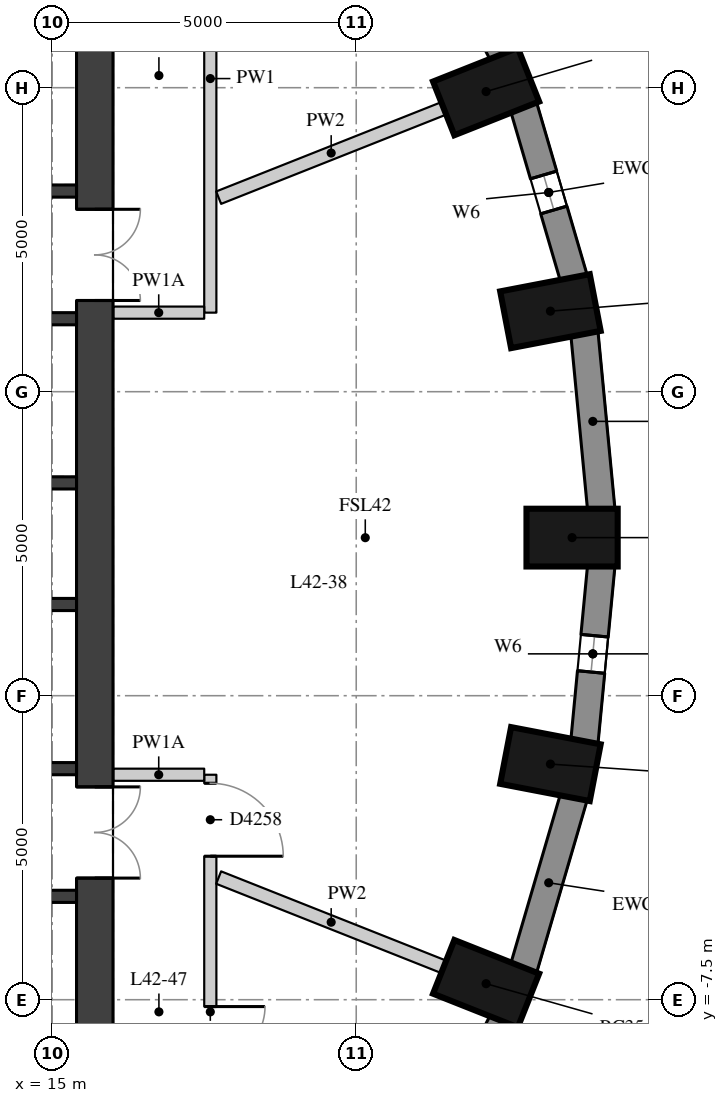
"""IFC4 building model, lengths in metres.
Left out: names, types, materials, properties, quantities, classifications, styles, units other than length and angle.
Written with IfcOpenShell. Run it as: python <this file> out.ifc"""

import sys

from ifc_helpers import new_model, si_unit, direction, frame, frame_2d, origin, origin_2d, place, context, subcontext, project, spatial, rectangle, extrude, element, fill, save


model = new_model("IFC4")
c1 = context("Model", 3, precision=1e-05, world=origin(), true_north=direction((0.0, 1.0)))
c2 = subcontext(c1, "Body", "Model", "MODEL_VIEW")
j1 = project(units=[si_unit("LENGTHUNIT", "METRE"), si_unit("PLANEANGLEUNIT", "RADIAN")], contexts=[c1])
p1 = place(None, origin())
s1 = spatial("IfcSite", under=j1, at=p1, CompositionType="ELEMENT")
p2 = place(p1, origin())
s2 = spatial("IfcBuilding", under=s1, at=p2, CompositionType="ELEMENT")
p3 = place(p2, frame((0.0, 0.0, 151.7)))
s3 = spatial("IfcBuildingStorey", under=s2, at=p3, CompositionType="ELEMENT", Elevation=151.7)
for number, where, z_axis, x_axis in (
    (1, (23.55, 0.1, 0.0), (0.0, 0.0, 1.0), (1.0, 0.0, 0.0)),
    (2, (23.194, 3.825, 0.0), (0.0, 0.0, 1.0), (0.982, 0.189, 0.0)),
    (3, (22.136, 7.436, 0.0), (0.0, 0.0, 1.0), (0.93, 0.369, 0.0)),
    (4, (22.136, -7.236, 0.0), (0.0, 0.0, 1.0), (0.93, -0.369, 0.0)),
    (5, (23.194, -3.625, 0.0), (0.0, 0.0, 1.0), (0.982, -0.189, 0.0)),
):
    element("IfcColumn", number, at=place(p3, frame(where, z_axis=z_axis, x_axis=x_axis)), inside=s3, PredefinedType="COLUMN", context=c2, shape_type="SweptSolid", body=[
        extrude(rectangle(XDim=1.5, YDim=0.95, at=origin_2d()), origin(), (0.0, 0.0, 1.0), 3.3),
    ])
p4 = place(p3, frame((24.031, 0.555, 0.0), z_axis=(0.0, 0.0, 1.0), x_axis=(-0.095265737322, 0.995451876935, 0.0)))
e6 = element("IfcWall", 6, at=p4, inside=s3, PredefinedType="SOLIDWALL", context=c2, shape_type="SweptSolid", body=[
    extrude(rectangle(XDim=2.927, YDim=0.45, at=frame_2d((1.463, 0.0))), origin(), (0.0, 0.0, 1.0), 3.02),
])
p5 = place(p3, frame((23.58, 4.362, 0.0), z_axis=(0.0, 0.0, 1.0), x_axis=(-0.281049481624, 0.959693278542, 0.0)))
e7 = element("IfcWall", 7, at=p5, inside=s3, PredefinedType="SOLIDWALL", context=c2, shape_type="SweptSolid", body=[
    extrude(rectangle(XDim=2.948, YDim=0.45, at=frame_2d((1.474, 0.0))), origin(), (0.0, 0.0, 1.0), 3.02),
])
p6 = place(p5, frame((1.174, 0.0, 0.4)))
e8 = element("IfcOpeningElement", 8, at=p6, cuts=e7, PredefinedType="OPENING", context=c2, shape_type="SweptSolid", body=[
    extrude(rectangle(XDim=0.6, YDim=1.75, at=frame_2d((0.3, 0.875))), frame((0.0, 0.235, 0.0), z_axis=(0.0, -1.0, 0.0), x_axis=(1.0, 0.0, 0.0)), (0.0, 0.0, 1.0), 0.47),
])
p7 = place(p3, frame((22.415, 8.037, 0.0), z_axis=(0.0, 0.0, 1.0), x_axis=(-0.454133999889, 0.890933392653, 0.0)))
e9 = element("IfcWall", 9, at=p7, inside=s3, PredefinedType="SOLIDWALL", context=c2, shape_type="SweptSolid", body=[
    extrude(rectangle(XDim=2.986, YDim=0.45, at=frame_2d((1.493, 0.0))), origin(), (0.0, 0.0, 1.0), 3.02),
])
p8 = place(p3, frame((21.059, -10.497, 0.0), z_axis=(0.0, 0.0, 1.0), x_axis=(0.454133999889, 0.890933392653, 0.0)))
e10 = element("IfcWall", 10, at=p8, inside=s3, PredefinedType="SOLIDWALL", context=c2, shape_type="SweptSolid", body=[
    extrude(rectangle(XDim=2.986, YDim=0.45, at=frame_2d((1.493, 0.0))), origin(), (0.0, 0.0, 1.0), 3.02),
])
p9 = place(p8, frame((1.193, 0.0, 0.4)))
e11 = element("IfcOpeningElement", 11, at=p9, cuts=e10, PredefinedType="OPENING", context=c2, shape_type="SweptSolid", body=[
    extrude(rectangle(XDim=0.6, YDim=1.75, at=frame_2d((0.3, 0.875))), frame((0.0, 0.235, 0.0), z_axis=(0.0, -1.0, 0.0), x_axis=(1.0, 0.0, 0.0)), (0.0, 0.0, 1.0), 0.47),
])
p10 = place(p3, frame((22.751, -6.991, 0.0), z_axis=(0.0, 0.0, 1.0), x_axis=(0.281049481624, 0.959693278542, 0.0)))
e12 = element("IfcWall", 12, at=p10, inside=s3, PredefinedType="SOLIDWALL", context=c2, shape_type="SweptSolid", body=[
    extrude(rectangle(XDim=2.948, YDim=0.45, at=frame_2d((1.474, 0.0))), origin(), (0.0, 0.0, 1.0), 3.02),
])
p11 = place(p3, frame((23.752, -3.269, 0.0), z_axis=(0.0, 0.0, 1.0), x_axis=(0.095257827044, 0.995452633924, 0.0)))
e13 = element("IfcWall", 13, at=p11, inside=s3, PredefinedType="SOLIDWALL", context=c2, shape_type="SweptSolid", body=[
    extrude(rectangle(XDim=2.927, YDim=0.45, at=frame_2d((1.463, 0.0))), origin(), (0.0, 0.0, 1.0), 3.02),
])
p12 = place(p11, frame((1.163, 0.0, 0.4)))
e14 = element("IfcOpeningElement", 14, at=p12, cuts=e13, PredefinedType="OPENING", context=c2, shape_type="SweptSolid", body=[
    extrude(rectangle(XDim=0.6, YDim=1.75, at=frame_2d((0.3, 0.875))), frame((0.0, 0.235, 0.0), z_axis=(0.0, -1.0, 0.0), x_axis=(1.0, 0.0, 0.0)), (0.0, 0.0, 1.0), 0.47),
])
p13 = place(p3, frame((15.7, -9.4, 0.0), z_axis=(0.0, 0.0, 1.0), x_axis=(0.0, 1.0, 0.0)))
e15 = element("IfcWall", 15, at=p13, inside=s3, PredefinedType="SHEAR", context=c2, shape_type="SweptSolid", body=[
    extrude(rectangle(XDim=18.8, YDim=0.6, at=frame_2d((9.4, 0.0))), origin(), (0.0, 0.0, 1.0), 3.02),
])
p14 = place(p13, frame((13.4, 0.0, 0.0)))
e16 = element("IfcOpeningElement", 16, at=p14, cuts=e15, PredefinedType="OPENING", context=c2, shape_type="SweptSolid", body=[
    extrude(rectangle(XDim=1.5, YDim=2.1, at=frame_2d((0.75, 1.05))), frame((0.0, 0.31, 0.0), z_axis=(0.0, -1.0, 0.0), x_axis=(1.0, 0.0, 0.0)), (0.0, 0.0, 1.0), 0.62),
])
p15 = place(p13, frame((3.9, 0.0, 0.0)))
e17 = element("IfcOpeningElement", 17, at=p15, cuts=e15, PredefinedType="OPENING", context=c2, shape_type="SweptSolid", body=[
    extrude(rectangle(XDim=1.5, YDim=2.1, at=frame_2d((0.75, 1.05))), frame((0.0, 0.31, 0.0), z_axis=(0.0, -1.0, 0.0), x_axis=(1.0, 0.0, 0.0)), (0.0, 0.0, 1.0), 0.62),
])
p16 = place(p3, frame((4.6, 5.8, 0.0), z_axis=(0.0, 0.0, 1.0), x_axis=(1.0, 0.0, 0.0)))
e18 = element("IfcWall", 18, at=p16, inside=s3, PredefinedType="SHEAR", context=c2, shape_type="SweptSolid", body=[
    extrude(rectangle(XDim=10.8, YDim=0.2, at=frame_2d((5.4, 0.0))), origin(), (0.0, 0.0, 1.0), 3.02),
])
p17 = place(p16, frame((7.05, 0.0, 0.0)))
e19 = element("IfcOpeningElement", 19, at=p17, cuts=e18, PredefinedType="OPENING", context=c2, shape_type="SweptSolid", body=[
    extrude(rectangle(XDim=1.1, YDim=2.1, at=frame_2d((0.55, 1.05))), frame((0.0, 0.11, 0.0), z_axis=(0.0, -1.0, 0.0), x_axis=(1.0, 0.0, 0.0)), (0.0, 0.0, 1.0), 0.22),
])
p18 = place(p16, frame((9.05, 0.0, 0.0)))
e20 = element("IfcOpeningElement", 20, at=p18, cuts=e18, PredefinedType="OPENING", context=c2, shape_type="SweptSolid", body=[
    extrude(rectangle(XDim=1.1, YDim=2.1, at=frame_2d((0.55, 1.05))), frame((0.0, 0.11, 0.0), z_axis=(0.0, -1.0, 0.0), x_axis=(1.0, 0.0, 0.0)), (0.0, 0.0, 1.0), 0.22),
])
p19 = place(p3, frame((4.6, 3.7, 0.0), z_axis=(0.0, 0.0, 1.0), x_axis=(1.0, 0.0, 0.0)))
e21 = element("IfcWall", 21, at=p19, inside=s3, PredefinedType="SHEAR", context=c2, shape_type="SweptSolid", body=[
    extrude(rectangle(XDim=10.8, YDim=0.2, at=frame_2d((5.4, 0.0))), origin(), (0.0, 0.0, 1.0), 3.02),
])
p20 = place(p19, frame((6.6, 0.0, 0.0)))
e22 = element("IfcOpeningElement", 22, at=p20, cuts=e21, PredefinedType="OPENING", context=c2, shape_type="SweptSolid", body=[
    extrude(rectangle(XDim=1.1, YDim=2.1, at=frame_2d((0.55, 1.05))), frame((0.0, 0.11, 0.0), z_axis=(0.0, -1.0, 0.0), x_axis=(1.0, 0.0, 0.0)), (0.0, 0.0, 1.0), 0.22),
])
p21 = place(p19, frame((8.9, 0.0, 0.0)))
e23 = element("IfcOpeningElement", 23, at=p21, cuts=e21, PredefinedType="OPENING", context=c2, shape_type="SweptSolid", body=[
    extrude(rectangle(XDim=1.1, YDim=2.1, at=frame_2d((0.55, 1.05))), frame((0.0, 0.11, 0.0), z_axis=(0.0, -1.0, 0.0), x_axis=(1.0, 0.0, 0.0)), (0.0, 0.0, 1.0), 0.22),
])
for number, where, z_axis, x_axis in (
    (24, (4.6, 1.0, 0.0), (0.0, 0.0, 1.0), (1.0, 0.0, 0.0)),
    (25, (4.6, -1.0, 0.0), (0.0, 0.0, 1.0), (1.0, 0.0, 0.0)),
):
    element("IfcWall", number, at=place(p3, frame(where, z_axis=z_axis, x_axis=x_axis)), inside=s3, PredefinedType="SHEAR", context=c2, shape_type="SweptSolid", body=[
        extrude(rectangle(XDim=10.8, YDim=0.2, at=frame_2d((5.4, 0.0))), origin(), (0.0, 0.0, 1.0), 3.02),
    ])
p22 = place(p3, frame((4.6, -3.7, 0.0), z_axis=(0.0, 0.0, 1.0), x_axis=(1.0, 0.0, 0.0)))
e26 = element("IfcWall", 26, at=p22, inside=s3, PredefinedType="SHEAR", context=c2, shape_type="SweptSolid", body=[
    extrude(rectangle(XDim=10.8, YDim=0.2, at=frame_2d((5.4, 0.0))), origin(), (0.0, 0.0, 1.0), 3.02),
])
p23 = place(p22, frame((6.6, 0.0, 0.0)))
e27 = element("IfcOpeningElement", 27, at=p23, cuts=e26, PredefinedType="OPENING", context=c2, shape_type="SweptSolid", body=[
    extrude(rectangle(XDim=1.1, YDim=2.1, at=frame_2d((0.55, 1.05))), frame((0.0, 0.11, 0.0), z_axis=(0.0, -1.0, 0.0), x_axis=(1.0, 0.0, 0.0)), (0.0, 0.0, 1.0), 0.22),
])
p24 = place(p22, frame((8.9, 0.0, 0.0)))
e28 = element("IfcOpeningElement", 28, at=p24, cuts=e26, PredefinedType="OPENING", context=c2, shape_type="SweptSolid", body=[
    extrude(rectangle(XDim=1.1, YDim=2.1, at=frame_2d((0.55, 1.05))), frame((0.0, 0.11, 0.0), z_axis=(0.0, -1.0, 0.0), x_axis=(1.0, 0.0, 0.0)), (0.0, 0.0, 1.0), 0.22),
])
p25 = place(p3, frame((4.6, -5.8, 0.0), z_axis=(0.0, 0.0, 1.0), x_axis=(1.0, 0.0, 0.0)))
e29 = element("IfcWall", 29, at=p25, inside=s3, PredefinedType="SHEAR", context=c2, shape_type="SweptSolid", body=[
    extrude(rectangle(XDim=10.8, YDim=0.2, at=frame_2d((5.4, 0.0))), origin(), (0.0, 0.0, 1.0), 3.02),
])
p26 = place(p3, frame((17.6, -3.8, 0.0), z_axis=(0.0, 0.0, 1.0), x_axis=(0.0, -1.0, 0.0)))
e30 = element("IfcWall", 30, at=p26, inside=s3, PredefinedType="PARTITIONING", context=c2, shape_type="SweptSolid", body=[
    extrude(rectangle(XDim=7.8, YDim=0.2, at=frame_2d((3.9, 0.0))), origin(), (0.0, 0.0, 1.0), 3.02),
])
p27 = place(p26, frame((3.813, 0.0, 0.0)))
e31 = element("IfcOpeningElement", 31, at=p27, cuts=e30, PredefinedType="OPENING", context=c2, shape_type="SweptSolid", body=[
    extrude(rectangle(XDim=1.8, YDim=2.1, at=frame_2d((0.9, 1.05))), frame((0.0, 0.11, 0.0), z_axis=(0.0, -1.0, 0.0), x_axis=(1.0, 0.0, 0.0)), (0.0, 0.0, 1.0), 0.22),
])
p28 = place(p26, frame((0.14, 0.0, 0.0)))
e32 = element("IfcOpeningElement", 32, at=p28, cuts=e30, PredefinedType="OPENING", context=c2, shape_type="SweptSolid", body=[
    extrude(rectangle(XDim=1.2, YDim=2.1, at=frame_2d((0.6, 1.05))), frame((0.0, 0.11, 0.0), z_axis=(0.0, -1.0, 0.0), x_axis=(1.0, 0.0, 0.0)), (0.0, 0.0, 1.0), 0.22),
])
p29 = place(p3, frame((17.6, 11.5, 0.0), z_axis=(0.0, 0.0, 1.0), x_axis=(0.0, -1.0, 0.0)))
e33 = element("IfcWall", 33, at=p29, inside=s3, PredefinedType="PARTITIONING", context=c2, shape_type="SweptSolid", body=[
    extrude(rectangle(XDim=7.7, YDim=0.2, at=frame_2d((3.85, 0.0))), origin(), (0.0, 0.0, 1.0), 3.02),
])
for number, where, z_axis, x_axis in (
    (34, (17.5, 3.8, 0.0), (0.0, 0.0, 1.0), (-1.0, 0.0, 0.0)),
    (35, (16.004, -3.8, 0.0), (0.0, 0.0, 1.0), (1.0, 0.0, 0.0)),
):
    element("IfcWall", number, at=place(p3, frame(where, z_axis=z_axis, x_axis=x_axis)), inside=s3, PredefinedType="PARTITIONING", context=c2, shape_type="SweptSolid", body=[
        extrude(rectangle(XDim=1.496, YDim=0.2, at=frame_2d((0.748, 0.0))), origin(), (0.0, 0.0, 1.0), 2.57),
    ])
for number, where, z_axis, x_axis in (
    (36, (21.439, 7.16, 0.0), (0.0, 0.0, 1.0), (-0.93, -0.369, 0.0)),
    (37, (21.439, -6.96, 0.0), (0.0, 0.0, 1.0), (-0.93, 0.369, 0.0)),
):
    element("IfcWall", number, at=place(p3, frame(where, z_axis=z_axis, x_axis=x_axis)), inside=s3, PredefinedType="PARTITIONING", context=c2, shape_type="SweptSolid", body=[
        extrude(rectangle(XDim=3.982, YDim=0.22, at=frame_2d((1.991, 0.0))), origin(), (0.0, 0.0, 1.0), 3.02),
    ])
p30 = place(p6, origin())
e38 = element("IfcWindow", 38, at=p30, inside=s3, PartitioningType="SINGLE_PANEL", PredefinedType="WINDOW", context=c2, shape_type="SweptSolid", body=[
    extrude(rectangle(XDim=0.6, YDim=1.75, at=frame_2d((0.3, 0.875))), frame((0.0, 0.035, 0.0), z_axis=(0.0, -1.0, 0.0), x_axis=(1.0, 0.0, 0.0)), (0.0, 0.0, 1.0), 0.06),
])
fill(e8, e38)
p31 = place(p12, origin())
e39 = element("IfcWindow", 39, at=p31, inside=s3, PartitioningType="SINGLE_PANEL", PredefinedType="WINDOW", context=c2, shape_type="SweptSolid", body=[
    extrude(rectangle(XDim=0.6, YDim=1.75, at=frame_2d((0.3, 0.875))), frame((0.0, 0.035, 0.0), z_axis=(0.0, -1.0, 0.0), x_axis=(1.0, 0.0, 0.0)), (0.0, 0.0, 1.0), 0.06),
])
fill(e14, e39)
p32 = place(p14, origin())
e40 = element("IfcDoor", 40, at=p32, inside=s3, OperationType="DOUBLE_DOOR_SINGLE_SWING", PredefinedType="DOOR", context=c2, shape_type="SweptSolid", body=[
    extrude(rectangle(XDim=1.5, YDim=2.1, at=frame_2d((0.75, 1.05))), frame((0.0, 0.025, 0.0), z_axis=(0.0, -1.0, 0.0), x_axis=(1.0, 0.0, 0.0)), (0.0, 0.0, 1.0), 0.05),
])
fill(e16, e40)
p33 = place(p15, origin())
e41 = element("IfcDoor", 41, at=p33, inside=s3, OperationType="DOUBLE_DOOR_SINGLE_SWING", PredefinedType="DOOR", context=c2, shape_type="SweptSolid", body=[
    extrude(rectangle(XDim=1.5, YDim=2.1, at=frame_2d((0.75, 1.05))), frame((0.0, 0.025, 0.0), z_axis=(0.0, -1.0, 0.0), x_axis=(1.0, 0.0, 0.0)), (0.0, 0.0, 1.0), 0.05),
])
fill(e17, e41)
p34 = place(p27, origin())
e42 = element("IfcDoor", 42, at=p34, inside=s3, OperationType="DOUBLE_DOOR_SINGLE_SWING", PredefinedType="DOOR", context=c2, shape_type="SweptSolid", body=[
    extrude(rectangle(XDim=1.8, YDim=2.1, at=frame_2d((0.9, 1.05))), frame((0.0, 0.025, 0.0), z_axis=(0.0, -1.0, 0.0), x_axis=(1.0, 0.0, 0.0)), (0.0, 0.0, 1.0), 0.05),
])
fill(e31, e42)
p35 = place(p28, origin())
e43 = element("IfcDoor", 43, at=p35, inside=s3, OperationType="SINGLE_SWING_RIGHT", PredefinedType="DOOR", context=c2, shape_type="SweptSolid", body=[
    extrude(rectangle(XDim=1.2, YDim=2.1, at=frame_2d((0.6, 1.05))), frame((0.0, 0.025, 0.0), z_axis=(0.0, -1.0, 0.0), x_axis=(1.0, 0.0, 0.0)), (0.0, 0.0, 1.0), 0.05),
])
fill(e32, e43)
save(model, sys.argv[1])
